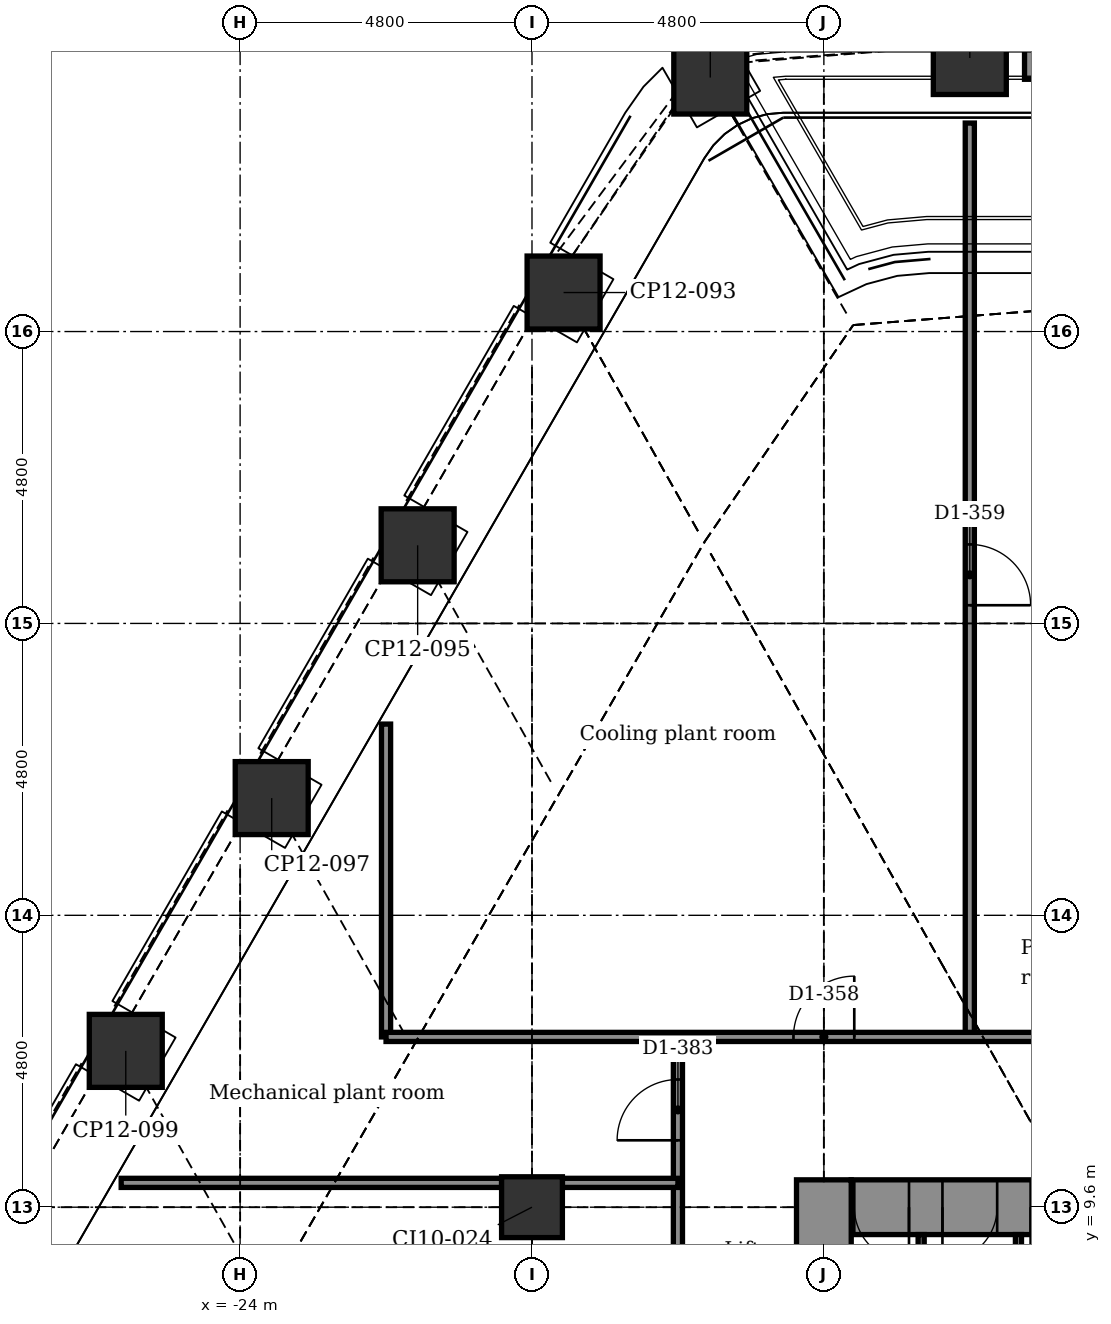
"""IFC4 building model, lengths in metres.
Left out: names, types, materials, properties, quantities, classifications, styles, units other than length and angle.
Written with IfcOpenShell. Run it as: python <this file> out.ifc"""

import sys

from ifc_helpers import new_model, si_unit, direction, frame, frame_2d, origin, origin_2d, place, context, subcontext, project, spatial, rectangle, extrude, element, fill, save


model = new_model("IFC4")
c1 = context("Model", 3, precision=1e-05, world=origin(), true_north=direction((0.0, 1.0)))
c2 = subcontext(c1, "Body", "Model", "MODEL_VIEW")
j1 = project(units=[si_unit("LENGTHUNIT", "METRE"), si_unit("PLANEANGLEUNIT", "RADIAN")], contexts=[c1])
p1 = place(None, origin())
s1 = spatial("IfcSite", under=j1, at=p1, CompositionType="ELEMENT")
p2 = place(p1, origin())
s2 = spatial("IfcBuilding", under=s1, at=p2, CompositionType="ELEMENT")
p3 = place(p2, frame((0.0, 0.0, 127.4)))
s3 = spatial("IfcBuildingStorey", under=s2, at=p3, CompositionType="ELEMENT", Elevation=127.4)
for number, where, z_axis, x_axis in (
    (1, (-16.268, 28.177, -0.3), (0.0, 0.0, 1.0), (0.866, 0.5, 0.0)),
    (2, (-12.0, 28.499, -0.3), (0.0, 0.0, 1.0), (1.0, 0.0, 0.0)),
    (3, (-25.88, 12.171, -0.3), (0.0, 0.0, 1.0), (0.5, 0.866, 0.0)),
    (4, (-23.48, 16.328, -0.3), (0.0, 0.0, 1.0), (0.5, 0.866, 0.0)),
    (5, (-21.08, 20.485, -0.3), (0.0, 0.0, 1.0), (0.5, 0.866, 0.0)),
    (6, (-18.68, 24.642, -0.3), (0.0, 0.0, 1.0), (0.5, 0.866, 0.0)),
):
    element("IfcColumn", number, at=place(p3, frame(where, z_axis=z_axis, x_axis=x_axis)), inside=s3, PredefinedType="COLUMN", context=c2, shape_type="SweptSolid", body=[
        extrude(rectangle(XDim=1.2, YDim=1.2, at=origin_2d()), origin(), (0.0, 0.0, 1.0), 6.15),
    ])
p4 = place(p3, frame((-19.2, 9.6, -0.3), z_axis=(0.0, 0.0, 1.0), x_axis=(1.0, 0.0, 0.0)))
e7 = element("IfcColumn", 7, at=p4, inside=s3, PredefinedType="COLUMN", context=c2, shape_type="SweptSolid", body=[
    extrude(rectangle(XDim=1.0, YDim=1.0, at=origin_2d()), origin(), (0.0, 0.0, 1.0), 6.15),
])
p5 = place(p3, frame((-13.95, 9.6, -0.3), z_axis=(0.0, 0.0, 1.0), x_axis=(1.0, 0.0, 0.0)))
e8 = element("IfcWall", 8, at=p5, inside=s3, PredefinedType="SHEAR", context=c2, shape_type="SweptSolid", body=[
    extrude(rectangle(XDim=3.9, YDim=0.9, at=frame_2d((1.95, 0.0))), origin(), (0.0, 0.0, 1.0), 6.15),
])
p6 = place(p5, frame((0.05, 0.0, 0.3)))
e9 = element("IfcOpeningElement", 9, at=p6, cuts=e8, PredefinedType="OPENING", context=c2, shape_type="SweptSolid", body=[
    extrude(rectangle(XDim=0.9, YDim=2.1, at=frame_2d((0.45, 1.05))), frame((0.0, 0.46, 0.0), z_axis=(0.0, -1.0, 0.0), x_axis=(1.0, 0.0, 0.0)), (0.0, 0.0, 1.0), 0.92),
])
p7 = place(p5, frame((1.5, 0.0, 0.3)))
e10 = element("IfcOpeningElement", 10, at=p7, cuts=e8, PredefinedType="OPENING", context=c2, shape_type="SweptSolid", body=[
    extrude(rectangle(XDim=0.9, YDim=2.1, at=frame_2d((0.45, 1.05))), frame((0.0, 0.46, 0.0), z_axis=(0.0, -1.0, 0.0), x_axis=(1.0, 0.0, 0.0)), (0.0, 0.0, 1.0), 0.92),
])
p8 = place(p5, frame((2.95, 0.0, 0.3)))
e11 = element("IfcOpeningElement", 11, at=p8, cuts=e8, PredefinedType="OPENING", context=c2, shape_type="SweptSolid", body=[
    extrude(rectangle(XDim=0.9, YDim=2.1, at=frame_2d((0.45, 1.05))), frame((0.0, 0.46, 0.0), z_axis=(0.0, -1.0, 0.0), x_axis=(1.0, 0.0, 0.0)), (0.0, 0.0, 1.0), 0.92),
])
p9 = place(p3, frame((-14.4, -10.05, -0.3), z_axis=(0.0, 0.0, 1.0), x_axis=(0.0, 1.0, 0.0)))
e12 = element("IfcWall", 12, at=p9, inside=s3, PredefinedType="SHEAR", context=c2, shape_type="SweptSolid", body=[
    extrude(rectangle(XDim=20.1, YDim=0.9, at=frame_2d((10.05, 0.0))), origin(), (0.0, 0.0, 1.0), 6.15),
])
p10 = place(p9, frame((3.5, 0.0, 0.3)))
e13 = element("IfcOpeningElement", 13, at=p10, cuts=e12, PredefinedType="OPENING", context=c2, shape_type="SweptSolid", body=[
    extrude(rectangle(XDim=1.1, YDim=2.1, at=frame_2d((0.55, 1.05))), frame((0.0, 0.46, 0.0), z_axis=(0.0, -1.0, 0.0), x_axis=(1.0, 0.0, 0.0)), (0.0, 0.0, 1.0), 0.92),
])
p11 = place(p9, frame((5.9, 0.0, 0.3)))
e14 = element("IfcOpeningElement", 14, at=p11, cuts=e12, PredefinedType="OPENING", context=c2, shape_type="SweptSolid", body=[
    extrude(rectangle(XDim=1.1, YDim=2.1, at=frame_2d((0.55, 1.05))), frame((0.0, 0.46, 0.0), z_axis=(0.0, -1.0, 0.0), x_axis=(1.0, 0.0, 0.0)), (0.0, 0.0, 1.0), 0.92),
])
p12 = place(p9, frame((8.3, 0.0, 0.3)))
e15 = element("IfcOpeningElement", 15, at=p12, cuts=e12, PredefinedType="OPENING", context=c2, shape_type="SweptSolid", body=[
    extrude(rectangle(XDim=1.1, YDim=2.1, at=frame_2d((0.55, 1.05))), frame((0.0, 0.46, 0.0), z_axis=(0.0, -1.0, 0.0), x_axis=(1.0, 0.0, 0.0)), (0.0, 0.0, 1.0), 0.92),
])
p13 = place(p9, frame((10.7, 0.0, 0.3)))
e16 = element("IfcOpeningElement", 16, at=p13, cuts=e12, PredefinedType="OPENING", context=c2, shape_type="SweptSolid", body=[
    extrude(rectangle(XDim=1.1, YDim=2.1, at=frame_2d((0.55, 1.05))), frame((0.0, 0.46, 0.0), z_axis=(0.0, -1.0, 0.0), x_axis=(1.0, 0.0, 0.0)), (0.0, 0.0, 1.0), 0.92),
])
p14 = place(p3, frame((-11.1, 28.448, 0.0), z_axis=(0.0, 0.0, 1.0), x_axis=(1.0, 0.0, 0.0)))
e17 = element("IfcWall", 17, at=p14, inside=s3, PredefinedType="USERDEFINED", context=c2, shape_type="SweptSolid", body=[
    extrude(rectangle(XDim=3.0, YDim=0.6, at=frame_2d((1.5, 0.0))), origin(), (0.0, 0.0, 1.0), 0.7),
])
p15 = place(p3, frame((-11.2, 7.35, 0.0), z_axis=(0.0, 0.0, 1.0), x_axis=(0.0, 1.0, 0.0)))
e18 = element("IfcWall", 18, at=p15, inside=s3, PredefinedType="PARTITIONING", context=c2, shape_type="SweptSolid", body=[
    extrude(rectangle(XDim=1.8, YDim=0.1, at=frame_2d((0.9, 0.0))), origin(), (0.0, 0.0, 1.0), 5.85),
])
p16 = place(p3, frame((-12.0, 12.4, 0.0), z_axis=(0.0, 0.0, 1.0), x_axis=(0.0, 1.0, 0.0)))
e19 = element("IfcWall", 19, at=p16, inside=s3, PredefinedType="PARTITIONING", context=c2, shape_type="SweptSolid", body=[
    extrude(rectangle(XDim=15.029, YDim=0.15, at=frame_2d((7.514, 0.0))), origin(), (0.0, 0.0, 1.0), 5.7),
])
p17 = place(p16, frame((7.099, 0.0, 0.0)))
e20 = element("IfcOpeningElement", 20, at=p17, cuts=e19, PredefinedType="OPENING", context=c2, shape_type="SweptSolid", body=[
    extrude(rectangle(XDim=1.0, YDim=2.1, at=frame_2d((0.5, 1.05))), frame((0.0, 0.085, 0.0), z_axis=(0.0, -1.0, 0.0), x_axis=(1.0, 0.0, 0.0)), (0.0, 0.0, 1.0), 0.17),
])
p18 = place(p3, frame((-12.8, 7.35, 0.0), z_axis=(0.0, 0.0, 1.0), x_axis=(0.0, 1.0, 0.0)))
e21 = element("IfcWall", 21, at=p18, inside=s3, PredefinedType="PARTITIONING", context=c2, shape_type="SweptSolid", body=[
    extrude(rectangle(XDim=1.8, YDim=0.1, at=frame_2d((0.9, 0.0))), origin(), (0.0, 0.0, 1.0), 5.85),
])
p19 = place(p3, frame((-16.8, 3.95, 0.0), z_axis=(0.0, 0.0, 1.0), x_axis=(0.0, 1.0, 0.0)))
e22 = element("IfcWall", 22, at=p19, inside=s3, PredefinedType="PARTITIONING", context=c2, shape_type="SweptSolid", body=[
    extrude(rectangle(XDim=8.45, YDim=0.15, at=frame_2d((4.225, 0.0))), origin(), (0.0, 0.0, 1.0), 5.85),
])
p20 = place(p19, frame((2.25, 0.0, 0.0)))
e23 = element("IfcOpeningElement", 23, at=p20, cuts=e22, PredefinedType="OPENING", context=c2, shape_type="SweptSolid", body=[
    extrude(rectangle(XDim=1.0, YDim=2.1, at=frame_2d((0.5, 1.05))), frame((0.0, 0.085, 0.0), z_axis=(0.0, -1.0, 0.0), x_axis=(1.0, 0.0, 0.0)), (0.0, 0.0, 1.0), 0.17),
])
p21 = place(p19, frame((6.75, 0.0, 0.0)))
e24 = element("IfcOpeningElement", 24, at=p21, cuts=e22, PredefinedType="OPENING", context=c2, shape_type="SweptSolid", body=[
    extrude(rectangle(XDim=1.0, YDim=2.1, at=frame_2d((0.5, 1.05))), frame((0.0, 0.085, 0.0), z_axis=(0.0, -1.0, 0.0), x_axis=(1.0, 0.0, 0.0)), (0.0, 0.0, 1.0), 0.17),
])
p22 = place(p3, frame((-21.6, 12.4, 0.0), z_axis=(0.0, 0.0, 1.0), x_axis=(0.0, 1.0, 0.0)))
e25 = element("IfcWall", 25, at=p22, inside=s3, PredefinedType="PARTITIONING", context=c2, shape_type="SweptSolid", body=[
    extrude(rectangle(XDim=5.145, YDim=0.15, at=frame_2d((2.572, 0.0))), origin(), (0.0, 0.0, 1.0), 5.85),
])
p23 = place(p3, frame((-25.956, 10.0, 0.0), z_axis=(0.0, 0.0, 1.0), x_axis=(1.0, 0.0, 0.0)))
e26 = element("IfcWall", 26, at=p23, inside=s3, PredefinedType="PARTITIONING", context=c2, shape_type="SweptSolid", body=[
    extrude(rectangle(XDim=6.256, YDim=0.15, at=frame_2d((3.128, 0.0))), origin(), (0.0, 0.0, 1.0), 5.85),
])
p24 = place(p3, frame((-18.7, 10.0, 0.0), z_axis=(0.0, 0.0, 1.0), x_axis=(1.0, 0.0, 0.0)))
e27 = element("IfcWall", 27, at=p24, inside=s3, PredefinedType="PARTITIONING", context=c2, shape_type="SweptSolid", body=[
    extrude(rectangle(XDim=1.9, YDim=0.15, at=frame_2d((0.95, 0.0))), origin(), (0.0, 0.0, 1.0), 5.85),
])
p25 = place(p3, frame((-21.6, 12.4, 0.0), z_axis=(0.0, 0.0, 1.0), x_axis=(1.0, 0.0, 0.0)))
e28 = element("IfcWall", 28, at=p25, inside=s3, PredefinedType="PARTITIONING", context=c2, shape_type="SweptSolid", body=[
    extrude(rectangle(XDim=43.2, YDim=0.15, at=frame_2d((21.6, 0.0))), origin(), (0.0, 0.0, 1.0), 5.85),
])
p26 = place(p25, frame((6.7, 0.0, 0.0)))
e29 = element("IfcOpeningElement", 29, at=p26, cuts=e28, PredefinedType="OPENING", context=c2, shape_type="SweptSolid", body=[
    extrude(rectangle(XDim=1.0, YDim=2.1, at=frame_2d((0.5, 1.05))), frame((0.0, 0.085, 0.0), z_axis=(0.0, -1.0, 0.0), x_axis=(1.0, 0.0, 0.0)), (0.0, 0.0, 1.0), 0.17),
])
p27 = place(p25, frame((15.1, 0.0, 0.0)))
e30 = element("IfcOpeningElement", 30, at=p27, cuts=e28, PredefinedType="OPENING", context=c2, shape_type="SweptSolid", body=[
    extrude(rectangle(XDim=1.0, YDim=2.1, at=frame_2d((0.5, 1.05))), frame((0.0, 0.085, 0.0), z_axis=(0.0, -1.0, 0.0), x_axis=(1.0, 0.0, 0.0)), (0.0, 0.0, 1.0), 0.17),
])
p28 = place(p25, frame((19.9, 0.0, 0.0)))
e31 = element("IfcOpeningElement", 31, at=p28, cuts=e28, PredefinedType="OPENING", context=c2, shape_type="SweptSolid", body=[
    extrude(rectangle(XDim=1.0, YDim=2.1, at=frame_2d((0.5, 1.05))), frame((0.0, 0.085, 0.0), z_axis=(0.0, -1.0, 0.0), x_axis=(1.0, 0.0, 0.0)), (0.0, 0.0, 1.0), 0.17),
])
p29 = place(p25, frame((22.3, 0.0, 0.0)))
e32 = element("IfcOpeningElement", 32, at=p29, cuts=e28, PredefinedType="OPENING", context=c2, shape_type="SweptSolid", body=[
    extrude(rectangle(XDim=1.0, YDim=2.1, at=frame_2d((0.5, 1.05))), frame((0.0, 0.085, 0.0), z_axis=(0.0, -1.0, 0.0), x_axis=(1.0, 0.0, 0.0)), (0.0, 0.0, 1.0), 0.17),
])
p30 = place(p25, frame((25.245, 0.0, 0.0)))
e33 = element("IfcOpeningElement", 33, at=p30, cuts=e28, PredefinedType="OPENING", context=c2, shape_type="SweptSolid", body=[
    extrude(rectangle(XDim=1.0, YDim=2.1, at=frame_2d((0.5, 1.05))), frame((0.0, 0.085, 0.0), z_axis=(0.0, -1.0, 0.0), x_axis=(1.0, 0.0, 0.0)), (0.0, 0.0, 1.0), 0.17),
])
p31 = place(p25, frame((36.7, 0.0, 0.0)))
e34 = element("IfcOpeningElement", 34, at=p31, cuts=e28, PredefinedType="OPENING", context=c2, shape_type="SweptSolid", body=[
    extrude(rectangle(XDim=1.0, YDim=2.1, at=frame_2d((0.5, 1.05))), frame((0.0, 0.085, 0.0), z_axis=(0.0, -1.0, 0.0), x_axis=(1.0, 0.0, 0.0)), (0.0, 0.0, 1.0), 0.17),
])
p32 = place(p26, origin())
e35 = element("IfcDoor", 35, at=p32, inside=s3, OperationType="SINGLE_SWING_RIGHT", PredefinedType="DOOR", context=c2, shape_type="SweptSolid", body=[
    extrude(rectangle(XDim=1.0, YDim=2.1, at=frame_2d((0.5, 1.05))), frame((0.0, 0.025, 0.0), z_axis=(0.0, -1.0, 0.0), x_axis=(1.0, 0.0, 0.0)), (0.0, 0.0, 1.0), 0.05),
])
fill(e29, e35)
p33 = place(p17, frame((1.0, 0.0, 0.0), z_axis=(0.0, 0.0, 1.0), x_axis=(-1.0, 0.0, 0.0)))
e36 = element("IfcDoor", 36, at=p33, inside=s3, OperationType="SINGLE_SWING_LEFT", PredefinedType="DOOR", context=c2, shape_type="SweptSolid", body=[
    extrude(rectangle(XDim=1.0, YDim=2.1, at=frame_2d((0.5, 1.05))), frame((0.0, 0.025, 0.0), z_axis=(0.0, -1.0, 0.0), x_axis=(1.0, 0.0, 0.0)), (0.0, 0.0, 1.0), 0.05),
])
fill(e20, e36)
p34 = place(p21, origin())
e37 = element("IfcDoor", 37, at=p34, inside=s3, OperationType="SINGLE_SWING_LEFT", PredefinedType="DOOR", context=c2, shape_type="SweptSolid", body=[
    extrude(rectangle(XDim=1.0, YDim=2.1, at=frame_2d((0.5, 1.05))), frame((0.0, 0.025, 0.0), z_axis=(0.0, -1.0, 0.0), x_axis=(1.0, 0.0, 0.0)), (0.0, 0.0, 1.0), 0.05),
])
fill(e24, e37)
p35 = place(p6, frame((0.9, 0.0, 0.0), z_axis=(0.0, 0.0, 1.0), x_axis=(-1.0, 0.0, 0.0)))
e38 = element("IfcDoor", 38, at=p35, inside=s3, OperationType="SINGLE_SWING_RIGHT", PredefinedType="DOOR", context=c2, shape_type="SweptSolid", body=[
    extrude(rectangle(XDim=0.9, YDim=2.1, at=frame_2d((0.45, 1.05))), frame((0.0, 0.025, 0.0), z_axis=(0.0, -1.0, 0.0), x_axis=(1.0, 0.0, 0.0)), (0.0, 0.0, 1.0), 0.05),
])
fill(e9, e38)
p36 = place(p7, frame((0.9, 0.0, 0.0), z_axis=(0.0, 0.0, 1.0), x_axis=(-1.0, 0.0, 0.0)))
e39 = element("IfcDoor", 39, at=p36, inside=s3, OperationType="SINGLE_SWING_LEFT", PredefinedType="DOOR", context=c2, shape_type="SweptSolid", body=[
    extrude(rectangle(XDim=0.9, YDim=2.1, at=frame_2d((0.45, 1.05))), frame((0.0, 0.025, 0.0), z_axis=(0.0, -1.0, 0.0), x_axis=(1.0, 0.0, 0.0)), (0.0, 0.0, 1.0), 0.05),
])
fill(e10, e39)
save(model, sys.argv[1])
